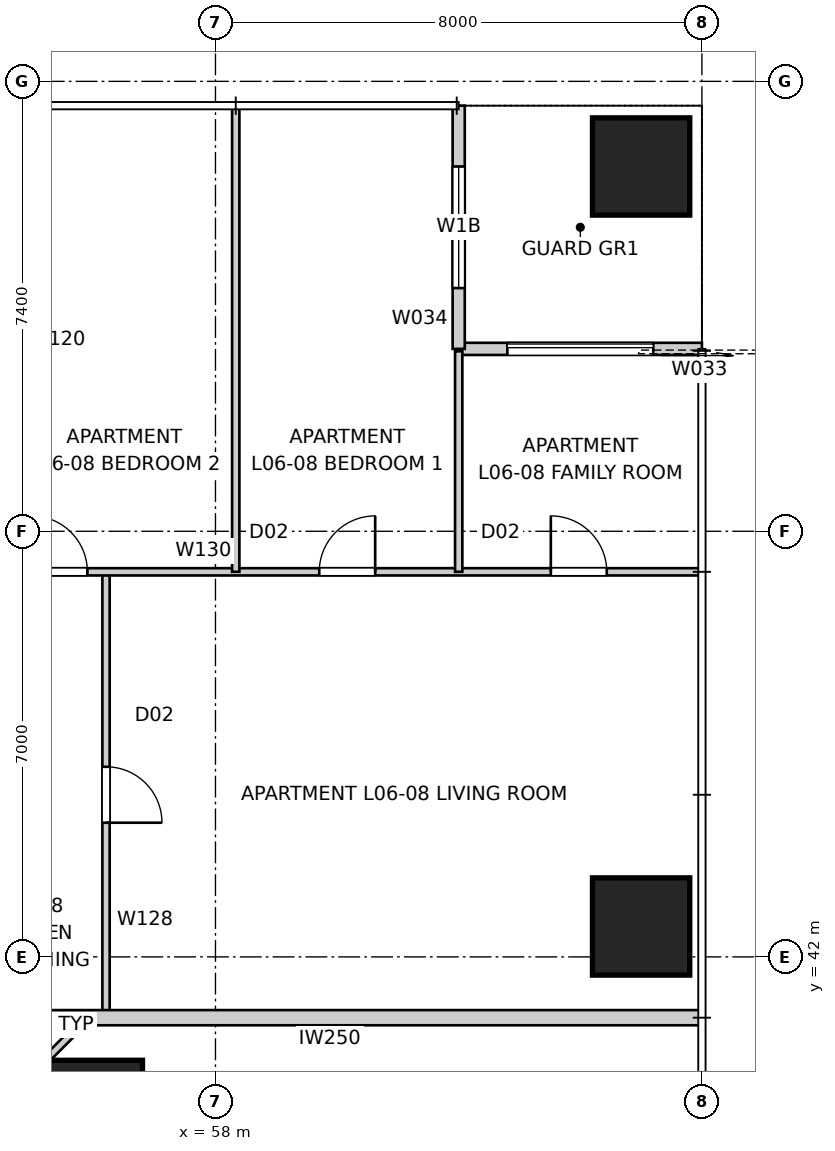
"""IFC4 building model, lengths in metres.
Left out: names, types, materials, properties, quantities, classifications, styles, units other than length and angle.
Written with IfcOpenShell. Run it as: python <this file> out.ifc"""

import sys

from ifc_helpers import new_model, si_unit, direction, frame, frame_2d, origin, origin_2d, place, context, subcontext, project, spatial, rectangle, extrude, element, fill, save


model = new_model("IFC4")
c1 = context("Model", 3, precision=1e-05, world=origin(), true_north=direction((0.0, 1.0)))
c2 = subcontext(c1, "Body", "Model", "MODEL_VIEW")
j1 = project(units=[si_unit("LENGTHUNIT", "METRE"), si_unit("PLANEANGLEUNIT", "RADIAN")], contexts=[c1])
p1 = place(None, origin())
s1 = spatial("IfcSite", under=j1, at=p1, CompositionType="ELEMENT")
p2 = place(p1, origin())
s2 = spatial("IfcBuilding", under=s1, at=p2, CompositionType="ELEMENT")
p3 = place(p2, frame((0.0, 0.0, 25.2)))
s3 = spatial("IfcBuildingStorey", under=s2, at=p3, CompositionType="ELEMENT", Elevation=25.2)
for number, where, z_axis, x_axis in (
    (1, (65.0, 42.5, 0.0), (0.0, 0.0, 1.0), (1.0, 0.0, 0.0)),
    (2, (65.0, 55.0, 0.0), (0.0, 0.0, 1.0), (1.0, 0.0, 0.0)),
    (3, (56.0, 39.5, 0.0), (0.0, 0.0, 1.0), (1.0, 0.0, 0.0)),
):
    element("IfcColumn", number, at=place(p3, frame(where, z_axis=z_axis, x_axis=x_axis)), inside=s3, PredefinedType="COLUMN", context=c2, shape_type="SweptSolid", body=[
        extrude(rectangle(XDim=1.6, YDim=1.6, at=origin_2d()), origin(), (0.0, 0.0, 1.0), 3.4),
    ])
p4 = place(p3, frame((66.0, 52.0, 0.0), z_axis=(0.0, 0.0, 1.0), x_axis=(-1.0, 0.0, 0.0)))
e4 = element("IfcWall", 4, at=p4, inside=s3, PredefinedType="SOLIDWALL", context=c2, shape_type="SweptSolid", body=[
    extrude(rectangle(XDim=4.0, YDim=0.2, at=frame_2d((2.0, 0.0))), origin(), (0.0, 0.0, 1.0), 3.25),
])
p5 = place(p4, frame((0.8, 0.0, 0.0)))
e5 = element("IfcOpeningElement", 5, at=p5, cuts=e4, PredefinedType="OPENING", context=c2, shape_type="SweptSolid", body=[
    extrude(rectangle(XDim=2.4, YDim=2.1, at=frame_2d((1.2, 1.05))), frame((0.0, 0.11, 0.0), z_axis=(0.0, -1.0, 0.0), x_axis=(1.0, 0.0, 0.0)), (0.0, 0.0, 1.0), 0.22),
])
p6 = place(p3, frame((62.0, 52.0, 0.0), z_axis=(0.0, 0.0, 1.0), x_axis=(0.0, 1.0, 0.0)))
e6 = element("IfcWall", 6, at=p6, inside=s3, PredefinedType="SOLIDWALL", context=c2, shape_type="SweptSolid", body=[
    extrude(rectangle(XDim=4.0, YDim=0.2, at=frame_2d((2.0, 0.0))), origin(), (0.0, 0.0, 1.0), 3.25),
])
p7 = place(p6, frame((1.0, 0.0, 0.45)))
e7 = element("IfcOpeningElement", 7, at=p7, cuts=e6, PredefinedType="OPENING", context=c2, shape_type="SweptSolid", body=[
    extrude(rectangle(XDim=2.0, YDim=1.8, at=frame_2d((1.0, 0.9))), frame((0.0, 0.11, 0.0), z_axis=(0.0, -1.0, 0.0), x_axis=(1.0, 0.0, 0.0)), (0.0, 0.0, 1.0), 0.22),
])
p8 = place(p3, frame((66.0, 41.0, 0.0), z_axis=(0.0, 0.0, 1.0), x_axis=(-1.0, 0.0, 0.0)))
e8 = element("IfcWall", 8, at=p8, inside=s3, PredefinedType="PARTITIONING", context=c2, shape_type="SweptSolid", body=[
    extrude(rectangle(XDim=12.24, YDim=0.25, at=frame_2d((6.12, 0.0))), origin(), (0.0, 0.0, 1.0), 3.25),
])
p9 = place(p3, frame((55.9, 41.0, 0.0), z_axis=(0.0, 0.0, 1.0), x_axis=(-0.707106781187, -0.707106781187, 0.0)))
e9 = element("IfcWall", 9, at=p9, inside=s3, PredefinedType="PARTITIONING", context=c2, shape_type="SweptSolid", body=[
    extrude(rectangle(XDim=0.919, YDim=0.12, at=frame_2d((0.459, 0.0))), origin(), (0.0, 0.0, 1.0), 3.25),
])
p10 = place(p3, frame((56.2, 48.333, 0.0), z_axis=(0.0, 0.0, 1.0), x_axis=(0.0, -1.0, 0.0)))
e10 = element("IfcWall", 10, at=p10, inside=s3, PredefinedType="PARTITIONING", context=c2, shape_type="SweptSolid", body=[
    extrude(rectangle(XDim=7.333, YDim=0.12, at=frame_2d((3.667, 0.0))), origin(), (0.0, 0.0, 1.0), 3.25),
])
p11 = place(p10, frame((3.207, 0.0, 0.0)))
e11 = element("IfcOpeningElement", 11, at=p11, cuts=e10, PredefinedType="OPENING", context=c2, shape_type="SweptSolid", body=[
    extrude(rectangle(XDim=0.92, YDim=2.34, at=frame_2d((0.46, 1.17))), frame((0.0, 0.07, 0.0), z_axis=(0.0, -1.0, 0.0), x_axis=(1.0, 0.0, 0.0)), (0.0, 0.0, 1.0), 0.14),
])
p12 = place(p3, frame((54.667, 48.333, 0.0), z_axis=(0.0, 0.0, 1.0), x_axis=(1.0, 0.0, 0.0)))
e12 = element("IfcWall", 12, at=p12, inside=s3, PredefinedType="PARTITIONING", context=c2, shape_type="SweptSolid", body=[
    extrude(rectangle(XDim=11.293, YDim=0.12, at=frame_2d((5.646, 0.0))), origin(), (0.0, 0.0, 1.0), 3.25),
])
p13 = place(p12, frame((0.307, 0.0, 0.0)))
e13 = element("IfcOpeningElement", 13, at=p13, cuts=e12, PredefinedType="OPENING", context=c2, shape_type="SweptSolid", body=[
    extrude(rectangle(XDim=0.92, YDim=2.34, at=frame_2d((0.46, 1.17))), frame((0.0, 0.07, 0.0), z_axis=(0.0, -1.0, 0.0), x_axis=(1.0, 0.0, 0.0)), (0.0, 0.0, 1.0), 0.14),
])
p14 = place(p12, frame((8.848, 0.0, 0.0)))
e14 = element("IfcOpeningElement", 14, at=p14, cuts=e12, PredefinedType="OPENING", context=c2, shape_type="SweptSolid", body=[
    extrude(rectangle(XDim=0.92, YDim=2.34, at=frame_2d((0.46, 1.17))), frame((0.0, 0.07, 0.0), z_axis=(0.0, -1.0, 0.0), x_axis=(1.0, 0.0, 0.0)), (0.0, 0.0, 1.0), 0.14),
])
p15 = place(p12, frame((5.04, 0.0, 0.0)))
e15 = element("IfcOpeningElement", 15, at=p15, cuts=e12, PredefinedType="OPENING", context=c2, shape_type="SweptSolid", body=[
    extrude(rectangle(XDim=0.92, YDim=2.34, at=frame_2d((0.46, 1.17))), frame((0.0, 0.07, 0.0), z_axis=(0.0, -1.0, 0.0), x_axis=(1.0, 0.0, 0.0)), (0.0, 0.0, 1.0), 0.14),
])
p16 = place(p3, frame((58.333, 48.333, 0.0), z_axis=(0.0, 0.0, 1.0), x_axis=(0.0, 1.0, 0.0)))
e16 = element("IfcWall", 16, at=p16, inside=s3, PredefinedType="PARTITIONING", context=c2, shape_type="SweptSolid", body=[
    extrude(rectangle(XDim=7.627, YDim=0.12, at=frame_2d((3.813, 0.0))), origin(), (0.0, 0.0, 1.0), 3.25),
])
p17 = place(p3, frame((62.0, 51.96, 0.0), z_axis=(0.0, 0.0, 1.0), x_axis=(0.0, -1.0, 0.0)))
e17 = element("IfcWall", 17, at=p17, inside=s3, PredefinedType="PARTITIONING", context=c2, shape_type="SweptSolid", body=[
    extrude(rectangle(XDim=3.627, YDim=0.12, at=frame_2d((1.813, 0.0))), origin(), (0.0, 0.0, 1.0), 3.25),
])
p18 = place(p5, origin())
e18 = element("IfcDoor", 18, at=p18, inside=s3, OperationType="SLIDING_TO_LEFT", PredefinedType="DOOR", context=c2, shape_type="SweptSolid", body=[
    extrude(rectangle(XDim=2.4, YDim=2.1, at=frame_2d((1.2, 1.05))), frame((0.0, 0.025, 0.0), z_axis=(0.0, -1.0, 0.0), x_axis=(1.0, 0.0, 0.0)), (0.0, 0.0, 1.0), 0.05),
])
fill(e5, e18)
p19 = place(p7, origin())
e19 = element("IfcWindow", 19, at=p19, inside=s3, PartitioningType="SINGLE_PANEL", PredefinedType="WINDOW", context=c2, shape_type="SweptSolid", body=[
    extrude(rectangle(XDim=2.0, YDim=1.8, at=frame_2d((1.0, 0.9))), frame((0.0, 0.03, 0.0), z_axis=(0.0, -1.0, 0.0), x_axis=(1.0, 0.0, 0.0)), (0.0, 0.0, 1.0), 0.06),
])
fill(e7, e19)
p20 = place(p11, origin())
e20 = element("IfcDoor", 20, at=p20, inside=s3, OperationType="SINGLE_SWING_RIGHT", PredefinedType="DOOR", context=c2, shape_type="SweptSolid", body=[
    extrude(rectangle(XDim=0.92, YDim=2.34, at=frame_2d((0.46, 1.17))), frame((0.0, 0.025, 0.0), z_axis=(0.0, -1.0, 0.0), x_axis=(1.0, 0.0, 0.0)), (0.0, 0.0, 1.0), 0.05),
])
fill(e11, e20)
p21 = place(p13, origin())
e21 = element("IfcDoor", 21, at=p21, inside=s3, OperationType="SINGLE_SWING_LEFT", PredefinedType="DOOR", context=c2, shape_type="SweptSolid", body=[
    extrude(rectangle(XDim=0.92, YDim=2.34, at=frame_2d((0.46, 1.17))), frame((0.0, 0.025, 0.0), z_axis=(0.0, -1.0, 0.0), x_axis=(1.0, 0.0, 0.0)), (0.0, 0.0, 1.0), 0.05),
])
fill(e13, e21)
p22 = place(p14, origin())
e22 = element("IfcDoor", 22, at=p22, inside=s3, OperationType="SINGLE_SWING_LEFT", PredefinedType="DOOR", context=c2, shape_type="SweptSolid", body=[
    extrude(rectangle(XDim=0.92, YDim=2.34, at=frame_2d((0.46, 1.17))), frame((0.0, 0.025, 0.0), z_axis=(0.0, -1.0, 0.0), x_axis=(1.0, 0.0, 0.0)), (0.0, 0.0, 1.0), 0.05),
])
fill(e14, e22)
p23 = place(p15, origin())
e23 = element("IfcDoor", 23, at=p23, inside=s3, OperationType="SINGLE_SWING_RIGHT", PredefinedType="DOOR", context=c2, shape_type="SweptSolid", body=[
    extrude(rectangle(XDim=0.92, YDim=2.34, at=frame_2d((0.46, 1.17))), frame((0.0, 0.025, 0.0), z_axis=(0.0, -1.0, 0.0), x_axis=(1.0, 0.0, 0.0)), (0.0, 0.0, 1.0), 0.05),
])
fill(e15, e23)
save(model, sys.argv[1])
